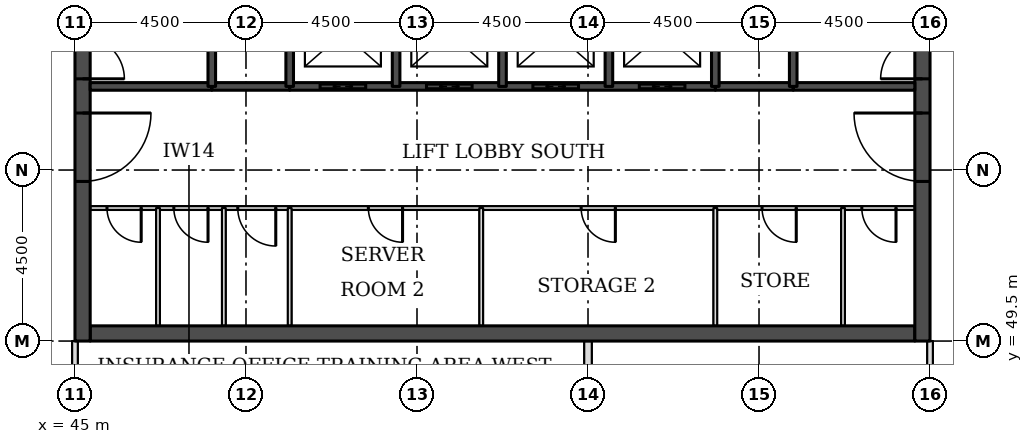
"""IFC4 building model, lengths in metres.
Left out: names, types, materials, properties, quantities, classifications, styles, units other than length and angle.
Written with IfcOpenShell. Run it as: python <this file> out.ifc"""

import sys

from ifc_helpers import new_model, si_unit, direction, frame, frame_2d, origin, place, context, subcontext, project, spatial, rectangle, extrude, element, fill, save


model = new_model("IFC4")
c1 = context("Model", 3, precision=1e-05, world=origin(), true_north=direction((0.0, 1.0)))
c2 = subcontext(c1, "Body", "Model", "MODEL_VIEW")
j1 = project(units=[si_unit("LENGTHUNIT", "METRE"), si_unit("PLANEANGLEUNIT", "RADIAN")], contexts=[c1])
p1 = place(None, origin())
s1 = spatial("IfcSite", under=j1, at=p1, CompositionType="ELEMENT")
p2 = place(p1, origin())
s2 = spatial("IfcBuilding", under=s1, at=p2, CompositionType="ELEMENT")
p3 = place(p2, frame((0.0, 0.0, 219.3)))
s3 = spatial("IfcBuildingStorey", under=s2, at=p3, CompositionType="ELEMENT", Elevation=219.3)
p4 = place(p3, frame((45.4, 49.7, 0.0), z_axis=(0.0, 0.0, 1.0), x_axis=(1.0, 0.0, 0.0)))
e1 = element("IfcWall", 1, at=p4, inside=s3, PredefinedType="SHEAR", context=c2, shape_type="SweptSolid", body=[
    extrude(rectangle(XDim=21.7, YDim=0.4, at=frame_2d((10.85, 0.0))), origin(), (0.0, 0.0, 1.0), 3.7),
])
p5 = place(p3, frame((45.2, 49.5, 0.0), z_axis=(0.0, 0.0, 1.0), x_axis=(0.0, 1.0, 0.0)))
e2 = element("IfcWall", 2, at=p5, inside=s3, PredefinedType="SHEAR", context=c2, shape_type="SweptSolid", body=[
    extrude(rectangle(XDim=22.5, YDim=0.4, at=frame_2d((11.25, 0.0))), origin(), (0.0, 0.0, 1.0), 3.7),
])
p6 = place(p5, frame((4.2, 0.0, 0.0)))
e3 = element("IfcOpeningElement", 3, at=p6, cuts=e2, PredefinedType="OPENING", context=c2, shape_type="SweptSolid", body=[
    extrude(rectangle(XDim=1.8, YDim=2.1, at=frame_2d((0.9, 1.05))), frame((0.0, 0.21, 0.0), z_axis=(0.0, -1.0, 0.0), x_axis=(1.0, 0.0, 0.0)), (0.0, 0.0, 1.0), 0.42),
])
p7 = place(p5, frame((6.9, 0.0, 0.0)))
e4 = element("IfcOpeningElement", 4, at=p7, cuts=e2, PredefinedType="OPENING", context=c2, shape_type="SweptSolid", body=[
    extrude(rectangle(XDim=1.1, YDim=2.1, at=frame_2d((0.55, 1.05))), frame((0.0, 0.21, 0.0), z_axis=(0.0, -1.0, 0.0), x_axis=(1.0, 0.0, 0.0)), (0.0, 0.0, 1.0), 0.42),
])
p8 = place(p5, frame((13.6, 0.0, 0.0)))
e5 = element("IfcOpeningElement", 5, at=p8, cuts=e2, PredefinedType="OPENING", context=c2, shape_type="SweptSolid", body=[
    extrude(rectangle(XDim=1.1, YDim=2.1, at=frame_2d((0.55, 1.05))), frame((0.0, 0.21, 0.0), z_axis=(0.0, -1.0, 0.0), x_axis=(1.0, 0.0, 0.0)), (0.0, 0.0, 1.0), 0.42),
])
p9 = place(p5, frame((16.5, 0.0, 0.0)))
e6 = element("IfcOpeningElement", 6, at=p9, cuts=e2, PredefinedType="OPENING", context=c2, shape_type="SweptSolid", body=[
    extrude(rectangle(XDim=1.8, YDim=2.1, at=frame_2d((0.9, 1.05))), frame((0.0, 0.21, 0.0), z_axis=(0.0, -1.0, 0.0), x_axis=(1.0, 0.0, 0.0)), (0.0, 0.0, 1.0), 0.42),
])
p10 = place(p3, frame((67.3, 49.5, 0.0), z_axis=(0.0, 0.0, 1.0), x_axis=(0.0, 1.0, 0.0)))
e7 = element("IfcWall", 7, at=p10, inside=s3, PredefinedType="SHEAR", context=c2, shape_type="SweptSolid", body=[
    extrude(rectangle(XDim=22.5, YDim=0.4, at=frame_2d((11.25, 0.0))), origin(), (0.0, 0.0, 1.0), 3.7),
])
p11 = place(p10, frame((4.2, 0.0, 0.0)))
e8 = element("IfcOpeningElement", 8, at=p11, cuts=e7, PredefinedType="OPENING", context=c2, shape_type="SweptSolid", body=[
    extrude(rectangle(XDim=1.8, YDim=2.1, at=frame_2d((0.9, 1.05))), frame((0.0, 0.21, 0.0), z_axis=(0.0, -1.0, 0.0), x_axis=(1.0, 0.0, 0.0)), (0.0, 0.0, 1.0), 0.42),
])
p12 = place(p10, frame((6.9, 0.0, 0.0)))
e9 = element("IfcOpeningElement", 9, at=p12, cuts=e7, PredefinedType="OPENING", context=c2, shape_type="SweptSolid", body=[
    extrude(rectangle(XDim=1.1, YDim=2.1, at=frame_2d((0.55, 1.05))), frame((0.0, 0.21, 0.0), z_axis=(0.0, -1.0, 0.0), x_axis=(1.0, 0.0, 0.0)), (0.0, 0.0, 1.0), 0.42),
])
p13 = place(p10, frame((13.6, 0.0, 0.0)))
e10 = element("IfcOpeningElement", 10, at=p13, cuts=e7, PredefinedType="OPENING", context=c2, shape_type="SweptSolid", body=[
    extrude(rectangle(XDim=1.1, YDim=2.1, at=frame_2d((0.55, 1.05))), frame((0.0, 0.21, 0.0), z_axis=(0.0, -1.0, 0.0), x_axis=(1.0, 0.0, 0.0)), (0.0, 0.0, 1.0), 0.42),
])
p14 = place(p10, frame((16.5, 0.0, 0.0)))
e11 = element("IfcOpeningElement", 11, at=p14, cuts=e7, PredefinedType="OPENING", context=c2, shape_type="SweptSolid", body=[
    extrude(rectangle(XDim=1.8, YDim=2.1, at=frame_2d((0.9, 1.05))), frame((0.0, 0.21, 0.0), z_axis=(0.0, -1.0, 0.0), x_axis=(1.0, 0.0, 0.0)), (0.0, 0.0, 1.0), 0.42),
])
p15 = place(p3, frame((58.5, 46.5, 0.0), z_axis=(0.0, 0.0, 1.0), x_axis=(0.0, 1.0, 0.0)))
e12 = element("IfcWall", 12, at=p15, inside=s3, PredefinedType="PARTITIONING", context=c2, shape_type="SweptSolid", body=[
    extrude(rectangle(XDim=3.0, YDim=0.2, at=frame_2d((1.5, 0.0))), origin(), (0.0, 0.0, 1.0), 3.55),
])
for number, where, z_axis, x_axis in (
    (13, (45.0, 48.0, 0.0), (0.0, 0.0, 1.0), (0.0, 1.0, 0.0)),
    (14, (67.5, 48.0, 0.0), (0.0, 0.0, 1.0), (0.0, 1.0, 0.0)),
):
    element("IfcWall", number, at=place(p3, frame(where, z_axis=z_axis, x_axis=x_axis)), inside=s3, PredefinedType="PARTITIONING", context=c2, shape_type="SweptSolid", body=[
        extrude(rectangle(XDim=1.5, YDim=0.15, at=frame_2d((0.75, 0.0))), origin(), (0.0, 0.0, 1.0), 3.022),
    ])
p16 = place(p3, frame((45.4, 53.0, 0.0), z_axis=(0.0, 0.0, 1.0), x_axis=(1.0, 0.0, 0.0)))
e15 = element("IfcWall", 15, at=p16, inside=s3, PredefinedType="PARTITIONING", context=c2, shape_type="SweptSolid", body=[
    extrude(rectangle(XDim=21.7, YDim=0.1, at=frame_2d((10.85, 0.0))), origin(), (0.0, 0.0, 1.0), 3.55),
])
p17 = place(p16, frame((20.305, 0.0, 0.0)))
e16 = element("IfcOpeningElement", 16, at=p17, cuts=e15, PredefinedType="OPENING", context=c2, shape_type="SweptSolid", body=[
    extrude(rectangle(XDim=0.9, YDim=2.1, at=frame_2d((0.45, 1.05))), frame((0.0, 0.06, 0.0), z_axis=(0.0, -1.0, 0.0), x_axis=(1.0, 0.0, 0.0)), (0.0, 0.0, 1.0), 0.12),
])
p18 = place(p16, frame((17.68, 0.0, 0.0)))
e17 = element("IfcOpeningElement", 17, at=p18, cuts=e15, PredefinedType="OPENING", context=c2, shape_type="SweptSolid", body=[
    extrude(rectangle(XDim=0.9, YDim=2.1, at=frame_2d((0.45, 1.05))), frame((0.0, 0.06, 0.0), z_axis=(0.0, -1.0, 0.0), x_axis=(1.0, 0.0, 0.0)), (0.0, 0.0, 1.0), 0.12),
])
p19 = place(p16, frame((0.442, 0.0, 0.0)))
e18 = element("IfcOpeningElement", 18, at=p19, cuts=e15, PredefinedType="OPENING", context=c2, shape_type="SweptSolid", body=[
    extrude(rectangle(XDim=0.9, YDim=2.1, at=frame_2d((0.45, 1.05))), frame((0.0, 0.06, 0.0), z_axis=(0.0, -1.0, 0.0), x_axis=(1.0, 0.0, 0.0)), (0.0, 0.0, 1.0), 0.12),
])
p20 = place(p16, frame((2.201, 0.0, 0.0)))
e19 = element("IfcOpeningElement", 19, at=p20, cuts=e15, PredefinedType="OPENING", context=c2, shape_type="SweptSolid", body=[
    extrude(rectangle(XDim=0.9, YDim=2.1, at=frame_2d((0.45, 1.05))), frame((0.0, 0.06, 0.0), z_axis=(0.0, -1.0, 0.0), x_axis=(1.0, 0.0, 0.0)), (0.0, 0.0, 1.0), 0.12),
])
p21 = place(p16, frame((3.884, 0.0, 0.0)))
e20 = element("IfcOpeningElement", 20, at=p21, cuts=e15, PredefinedType="OPENING", context=c2, shape_type="SweptSolid", body=[
    extrude(rectangle(XDim=1.0, YDim=2.1, at=frame_2d((0.5, 1.05))), frame((0.0, 0.06, 0.0), z_axis=(0.0, -1.0, 0.0), x_axis=(1.0, 0.0, 0.0)), (0.0, 0.0, 1.0), 0.12),
])
p22 = place(p16, frame((7.32, 0.0, 0.0)))
e21 = element("IfcOpeningElement", 21, at=p22, cuts=e15, PredefinedType="OPENING", context=c2, shape_type="SweptSolid", body=[
    extrude(rectangle(XDim=0.9, YDim=2.1, at=frame_2d((0.45, 1.05))), frame((0.0, 0.06, 0.0), z_axis=(0.0, -1.0, 0.0), x_axis=(1.0, 0.0, 0.0)), (0.0, 0.0, 1.0), 0.12),
])
p23 = place(p16, frame((12.92, 0.0, 0.0)))
e22 = element("IfcOpeningElement", 22, at=p23, cuts=e15, PredefinedType="OPENING", context=c2, shape_type="SweptSolid", body=[
    extrude(rectangle(XDim=0.9, YDim=2.1, at=frame_2d((0.45, 1.05))), frame((0.0, 0.06, 0.0), z_axis=(0.0, -1.0, 0.0), x_axis=(1.0, 0.0, 0.0)), (0.0, 0.0, 1.0), 0.12),
])
for number, where, z_axis, x_axis in (
    (23, (48.6, 56.2, 0.0), (0.0, 0.0, 1.0), (1.0, 0.0, 0.0)),
    (24, (61.85, 56.2, 0.0), (0.0, 0.0, 1.0), (1.0, 0.0, 0.0)),
):
    element("IfcWall", number, at=place(p3, frame(where, z_axis=z_axis, x_axis=x_axis)), inside=s3, PredefinedType="SOLIDWALL", context=c2, shape_type="SweptSolid", body=[
        extrude(rectangle(XDim=2.05, YDim=0.2, at=frame_2d((1.025, 0.0))), origin(), (0.0, 0.0, 1.0), 3.55),
    ])
p24 = place(p3, frame((45.4, 56.2, 0.0), z_axis=(0.0, 0.0, 1.0), x_axis=(1.0, 0.0, 0.0)))
e25 = element("IfcWall", 25, at=p24, inside=s3, PredefinedType="SOLIDWALL", context=c2, shape_type="SweptSolid", body=[
    extrude(rectangle(XDim=3.2, YDim=0.2, at=frame_2d((1.6, 0.0))), origin(), (0.0, 0.0, 1.0), 3.55),
])
p25 = place(p3, frame((50.65, 56.2, 0.0), z_axis=(0.0, 0.0, 1.0), x_axis=(1.0, 0.0, 0.0)))
e26 = element("IfcWall", 26, at=p25, inside=s3, PredefinedType="SOLIDWALL", context=c2, shape_type="SweptSolid", body=[
    extrude(rectangle(XDim=11.2, YDim=0.2, at=frame_2d((5.6, 0.0))), origin(), (0.0, 0.0, 1.0), 3.55),
])
p26 = place(p25, frame((0.8, 0.0, 0.0)))
e27 = element("IfcOpeningElement", 27, at=p26, cuts=e26, PredefinedType="OPENING", context=c2, shape_type="SweptSolid", body=[
    extrude(rectangle(XDim=1.2, YDim=2.1, at=frame_2d((0.6, 1.05))), frame((0.0, 0.11, 0.0), z_axis=(0.0, -1.0, 0.0), x_axis=(1.0, 0.0, 0.0)), (0.0, 0.0, 1.0), 0.22),
])
p27 = place(p25, frame((3.6, 0.0, 0.0)))
e28 = element("IfcOpeningElement", 28, at=p27, cuts=e26, PredefinedType="OPENING", context=c2, shape_type="SweptSolid", body=[
    extrude(rectangle(XDim=1.2, YDim=2.1, at=frame_2d((0.6, 1.05))), frame((0.0, 0.11, 0.0), z_axis=(0.0, -1.0, 0.0), x_axis=(1.0, 0.0, 0.0)), (0.0, 0.0, 1.0), 0.22),
])
p28 = place(p25, frame((6.4, 0.0, 0.0)))
e29 = element("IfcOpeningElement", 29, at=p28, cuts=e26, PredefinedType="OPENING", context=c2, shape_type="SweptSolid", body=[
    extrude(rectangle(XDim=1.2, YDim=2.1, at=frame_2d((0.6, 1.05))), frame((0.0, 0.11, 0.0), z_axis=(0.0, -1.0, 0.0), x_axis=(1.0, 0.0, 0.0)), (0.0, 0.0, 1.0), 0.22),
])
p29 = place(p25, frame((9.2, 0.0, 0.0)))
e30 = element("IfcOpeningElement", 30, at=p29, cuts=e26, PredefinedType="OPENING", context=c2, shape_type="SweptSolid", body=[
    extrude(rectangle(XDim=1.2, YDim=2.1, at=frame_2d((0.6, 1.05))), frame((0.0, 0.11, 0.0), z_axis=(0.0, -1.0, 0.0), x_axis=(1.0, 0.0, 0.0)), (0.0, 0.0, 1.0), 0.22),
])
p30 = place(p3, frame((63.9, 56.2, 0.0), z_axis=(0.0, 0.0, 1.0), x_axis=(1.0, 0.0, 0.0)))
e31 = element("IfcWall", 31, at=p30, inside=s3, PredefinedType="SOLIDWALL", context=c2, shape_type="SweptSolid", body=[
    extrude(rectangle(XDim=3.2, YDim=0.2, at=frame_2d((1.6, 0.0))), origin(), (0.0, 0.0, 1.0), 3.55),
])
p31 = place(p3, frame((47.185, 49.9, 0.0), z_axis=(0.0, 0.0, 1.0), x_axis=(0.0, 1.0, 0.0)))
e32 = element("IfcWall", 32, at=p31, inside=s3, PredefinedType="PARTITIONING", context=c2, shape_type="SweptSolid", body=[
    extrude(rectangle(XDim=3.1, YDim=0.1, at=frame_2d((1.55, 0.0))), origin(), (0.0, 0.0, 1.0), 3.55),
])
p32 = place(p3, frame((48.6, 56.2, 0.0), z_axis=(0.0, 0.0, 1.0), x_axis=(0.0, 1.0, 0.0)))
e33 = element("IfcWall", 33, at=p32, inside=s3, PredefinedType="SOLIDWALL", context=c2, shape_type="SweptSolid", body=[
    extrude(rectangle(XDim=5.8, YDim=0.2, at=frame_2d((2.9, 0.0))), origin(), (0.0, 0.0, 1.0), 3.55),
])
for number, where, z_axis, x_axis in (
    (34, (48.917, 49.9, 0.0), (0.0, 0.0, 1.0), (0.0, 1.0, 0.0)),
    (35, (50.65, 49.9, 0.0), (0.0, 0.0, 1.0), (0.0, 1.0, 0.0)),
):
    element("IfcWall", number, at=place(p3, frame(where, z_axis=z_axis, x_axis=x_axis)), inside=s3, PredefinedType="PARTITIONING", context=c2, shape_type="SweptSolid", body=[
        extrude(rectangle(XDim=3.1, YDim=0.1, at=frame_2d((1.55, 0.0))), origin(), (0.0, 0.0, 1.0), 3.55),
    ])
for number, where, z_axis, x_axis in (
    (36, (50.65, 56.2, 0.0), (0.0, 0.0, 1.0), (0.0, 1.0, 0.0)),
    (37, (53.45, 56.2, 0.0), (0.0, 0.0, 1.0), (0.0, 1.0, 0.0)),
):
    element("IfcWall", number, at=place(p3, frame(where, z_axis=z_axis, x_axis=x_axis)), inside=s3, PredefinedType="SOLIDWALL", context=c2, shape_type="SweptSolid", body=[
        extrude(rectangle(XDim=2.8, YDim=0.2, at=frame_2d((1.4, 0.0))), origin(), (0.0, 0.0, 1.0), 3.55),
    ])
p33 = place(p3, frame((55.69, 49.9, 0.0), z_axis=(0.0, 0.0, 1.0), x_axis=(0.0, 1.0, 0.0)))
e38 = element("IfcWall", 38, at=p33, inside=s3, PredefinedType="PARTITIONING", context=c2, shape_type="SweptSolid", body=[
    extrude(rectangle(XDim=3.1, YDim=0.1, at=frame_2d((1.55, 0.0))), origin(), (0.0, 0.0, 1.0), 3.55),
])
for number, where, z_axis, x_axis in (
    (39, (56.25, 56.2, 0.0), (0.0, 0.0, 1.0), (0.0, 1.0, 0.0)),
    (40, (59.05, 56.2, 0.0), (0.0, 0.0, 1.0), (0.0, 1.0, 0.0)),
):
    element("IfcWall", number, at=place(p3, frame(where, z_axis=z_axis, x_axis=x_axis)), inside=s3, PredefinedType="SOLIDWALL", context=c2, shape_type="SweptSolid", body=[
        extrude(rectangle(XDim=2.8, YDim=0.2, at=frame_2d((1.4, 0.0))), origin(), (0.0, 0.0, 1.0), 3.55),
    ])
p34 = place(p3, frame((61.85, 49.9, 0.0), z_axis=(0.0, 0.0, 1.0), x_axis=(0.0, 1.0, 0.0)))
e41 = element("IfcWall", 41, at=p34, inside=s3, PredefinedType="PARTITIONING", context=c2, shape_type="SweptSolid", body=[
    extrude(rectangle(XDim=3.1, YDim=0.1, at=frame_2d((1.55, 0.0))), origin(), (0.0, 0.0, 1.0), 3.55),
])
p35 = place(p3, frame((61.85, 56.2, 0.0), z_axis=(0.0, 0.0, 1.0), x_axis=(0.0, 1.0, 0.0)))
e42 = element("IfcWall", 42, at=p35, inside=s3, PredefinedType="SOLIDWALL", context=c2, shape_type="SweptSolid", body=[
    extrude(rectangle(XDim=2.8, YDim=0.2, at=frame_2d((1.4, 0.0))), origin(), (0.0, 0.0, 1.0), 3.55),
])
p36 = place(p3, frame((63.9, 56.2, 0.0), z_axis=(0.0, 0.0, 1.0), x_axis=(0.0, 1.0, 0.0)))
e43 = element("IfcWall", 43, at=p36, inside=s3, PredefinedType="SOLIDWALL", context=c2, shape_type="SweptSolid", body=[
    extrude(rectangle(XDim=5.8, YDim=0.2, at=frame_2d((2.9, 0.0))), origin(), (0.0, 0.0, 1.0), 3.55),
])
p37 = place(p3, frame((65.21, 49.9, 0.0), z_axis=(0.0, 0.0, 1.0), x_axis=(0.0, 1.0, 0.0)))
e44 = element("IfcWall", 44, at=p37, inside=s3, PredefinedType="PARTITIONING", context=c2, shape_type="SweptSolid", body=[
    extrude(rectangle(XDim=3.1, YDim=0.1, at=frame_2d((1.55, 0.0))), origin(), (0.0, 0.0, 1.0), 3.55),
])
p38 = place(p26, origin())
e45 = element("IfcDoor", 45, at=p38, inside=s3, OperationType="DOUBLE_DOOR_SLIDING", PredefinedType="DOOR", context=c2, shape_type="SweptSolid", body=[
    extrude(rectangle(XDim=1.2, YDim=2.1, at=frame_2d((0.6, 1.05))), frame((0.0, 0.025, 0.0), z_axis=(0.0, -1.0, 0.0), x_axis=(1.0, 0.0, 0.0)), (0.0, 0.0, 1.0), 0.05),
])
fill(e27, e45)
p39 = place(p27, origin())
e46 = element("IfcDoor", 46, at=p39, inside=s3, OperationType="DOUBLE_DOOR_SLIDING", PredefinedType="DOOR", context=c2, shape_type="SweptSolid", body=[
    extrude(rectangle(XDim=1.2, YDim=2.1, at=frame_2d((0.6, 1.05))), frame((0.0, 0.025, 0.0), z_axis=(0.0, -1.0, 0.0), x_axis=(1.0, 0.0, 0.0)), (0.0, 0.0, 1.0), 0.05),
])
fill(e28, e46)
p40 = place(p28, origin())
e47 = element("IfcDoor", 47, at=p40, inside=s3, OperationType="DOUBLE_DOOR_SLIDING", PredefinedType="DOOR", context=c2, shape_type="SweptSolid", body=[
    extrude(rectangle(XDim=1.2, YDim=2.1, at=frame_2d((0.6, 1.05))), frame((0.0, 0.025, 0.0), z_axis=(0.0, -1.0, 0.0), x_axis=(1.0, 0.0, 0.0)), (0.0, 0.0, 1.0), 0.05),
])
fill(e29, e47)
p41 = place(p29, origin())
e48 = element("IfcDoor", 48, at=p41, inside=s3, OperationType="DOUBLE_DOOR_SLIDING", PredefinedType="DOOR", context=c2, shape_type="SweptSolid", body=[
    extrude(rectangle(XDim=1.2, YDim=2.1, at=frame_2d((0.6, 1.05))), frame((0.0, 0.025, 0.0), z_axis=(0.0, -1.0, 0.0), x_axis=(1.0, 0.0, 0.0)), (0.0, 0.0, 1.0), 0.05),
])
fill(e30, e48)
p42 = place(p6, frame((1.8, 0.0, 0.0), z_axis=(0.0, 0.0, 1.0), x_axis=(-1.0, 0.0, 0.0)))
e49 = element("IfcDoor", 49, at=p42, inside=s3, OperationType="SINGLE_SWING_LEFT", PredefinedType="DOOR", context=c2, shape_type="SweptSolid", body=[
    extrude(rectangle(XDim=1.8, YDim=2.1, at=frame_2d((0.9, 1.05))), frame((0.0, 0.025, 0.0), z_axis=(0.0, -1.0, 0.0), x_axis=(1.0, 0.0, 0.0)), (0.0, 0.0, 1.0), 0.05),
])
fill(e3, e49)
p43 = place(p7, frame((1.1, 0.0, 0.0), z_axis=(0.0, 0.0, 1.0), x_axis=(-1.0, 0.0, 0.0)))
e50 = element("IfcDoor", 50, at=p43, inside=s3, OperationType="SINGLE_SWING_RIGHT", PredefinedType="DOOR", context=c2, shape_type="SweptSolid", body=[
    extrude(rectangle(XDim=1.1, YDim=2.1, at=frame_2d((0.55, 1.05))), frame((0.0, 0.025, 0.0), z_axis=(0.0, -1.0, 0.0), x_axis=(1.0, 0.0, 0.0)), (0.0, 0.0, 1.0), 0.05),
])
fill(e4, e50)
p44 = place(p11, origin())
e51 = element("IfcDoor", 51, at=p44, inside=s3, OperationType="SINGLE_SWING_RIGHT", PredefinedType="DOOR", context=c2, shape_type="SweptSolid", body=[
    extrude(rectangle(XDim=1.8, YDim=2.1, at=frame_2d((0.9, 1.05))), frame((0.0, 0.025, 0.0), z_axis=(0.0, -1.0, 0.0), x_axis=(1.0, 0.0, 0.0)), (0.0, 0.0, 1.0), 0.05),
])
fill(e8, e51)
p45 = place(p12, origin())
e52 = element("IfcDoor", 52, at=p45, inside=s3, OperationType="SINGLE_SWING_LEFT", PredefinedType="DOOR", context=c2, shape_type="SweptSolid", body=[
    extrude(rectangle(XDim=1.1, YDim=2.1, at=frame_2d((0.55, 1.05))), frame((0.0, 0.025, 0.0), z_axis=(0.0, -1.0, 0.0), x_axis=(1.0, 0.0, 0.0)), (0.0, 0.0, 1.0), 0.05),
])
fill(e9, e52)
p46 = place(p17, frame((0.9, 0.0, 0.0), z_axis=(0.0, 0.0, 1.0), x_axis=(-1.0, 0.0, 0.0)))
e53 = element("IfcDoor", 53, at=p46, inside=s3, OperationType="SINGLE_SWING_LEFT", PredefinedType="DOOR", context=c2, shape_type="SweptSolid", body=[
    extrude(rectangle(XDim=0.9, YDim=2.1, at=frame_2d((0.45, 1.05))), frame((0.0, 0.025, 0.0), z_axis=(0.0, -1.0, 0.0), x_axis=(1.0, 0.0, 0.0)), (0.0, 0.0, 1.0), 0.05),
])
fill(e16, e53)
p47 = place(p18, frame((0.9, 0.0, 0.0), z_axis=(0.0, 0.0, 1.0), x_axis=(-1.0, 0.0, 0.0)))
e54 = element("IfcDoor", 54, at=p47, inside=s3, OperationType="SINGLE_SWING_LEFT", PredefinedType="DOOR", context=c2, shape_type="SweptSolid", body=[
    extrude(rectangle(XDim=0.9, YDim=2.1, at=frame_2d((0.45, 1.05))), frame((0.0, 0.025, 0.0), z_axis=(0.0, -1.0, 0.0), x_axis=(1.0, 0.0, 0.0)), (0.0, 0.0, 1.0), 0.05),
])
fill(e17, e54)
p48 = place(p19, frame((0.9, 0.0, 0.0), z_axis=(0.0, 0.0, 1.0), x_axis=(-1.0, 0.0, 0.0)))
e55 = element("IfcDoor", 55, at=p48, inside=s3, OperationType="SINGLE_SWING_LEFT", PredefinedType="DOOR", context=c2, shape_type="SweptSolid", body=[
    extrude(rectangle(XDim=0.9, YDim=2.1, at=frame_2d((0.45, 1.05))), frame((0.0, 0.025, 0.0), z_axis=(0.0, -1.0, 0.0), x_axis=(1.0, 0.0, 0.0)), (0.0, 0.0, 1.0), 0.05),
])
fill(e18, e55)
p49 = place(p20, frame((0.9, 0.0, 0.0), z_axis=(0.0, 0.0, 1.0), x_axis=(-1.0, 0.0, 0.0)))
e56 = element("IfcDoor", 56, at=p49, inside=s3, OperationType="SINGLE_SWING_LEFT", PredefinedType="DOOR", context=c2, shape_type="SweptSolid", body=[
    extrude(rectangle(XDim=0.9, YDim=2.1, at=frame_2d((0.45, 1.05))), frame((0.0, 0.025, 0.0), z_axis=(0.0, -1.0, 0.0), x_axis=(1.0, 0.0, 0.0)), (0.0, 0.0, 1.0), 0.05),
])
fill(e19, e56)
p50 = place(p21, frame((1.0, 0.0, 0.0), z_axis=(0.0, 0.0, 1.0), x_axis=(-1.0, 0.0, 0.0)))
e57 = element("IfcDoor", 57, at=p50, inside=s3, OperationType="SINGLE_SWING_LEFT", PredefinedType="DOOR", context=c2, shape_type="SweptSolid", body=[
    extrude(rectangle(XDim=1.0, YDim=2.1, at=frame_2d((0.5, 1.05))), frame((0.0, 0.025, 0.0), z_axis=(0.0, -1.0, 0.0), x_axis=(1.0, 0.0, 0.0)), (0.0, 0.0, 1.0), 0.05),
])
fill(e20, e57)
p51 = place(p22, frame((0.9, 0.0, 0.0), z_axis=(0.0, 0.0, 1.0), x_axis=(-1.0, 0.0, 0.0)))
e58 = element("IfcDoor", 58, at=p51, inside=s3, OperationType="SINGLE_SWING_LEFT", PredefinedType="DOOR", context=c2, shape_type="SweptSolid", body=[
    extrude(rectangle(XDim=0.9, YDim=2.1, at=frame_2d((0.45, 1.05))), frame((0.0, 0.025, 0.0), z_axis=(0.0, -1.0, 0.0), x_axis=(1.0, 0.0, 0.0)), (0.0, 0.0, 1.0), 0.05),
])
fill(e21, e58)
p52 = place(p23, frame((0.9, 0.0, 0.0), z_axis=(0.0, 0.0, 1.0), x_axis=(-1.0, 0.0, 0.0)))
e59 = element("IfcDoor", 59, at=p52, inside=s3, OperationType="SINGLE_SWING_LEFT", PredefinedType="DOOR", context=c2, shape_type="SweptSolid", body=[
    extrude(rectangle(XDim=0.9, YDim=2.1, at=frame_2d((0.45, 1.05))), frame((0.0, 0.025, 0.0), z_axis=(0.0, -1.0, 0.0), x_axis=(1.0, 0.0, 0.0)), (0.0, 0.0, 1.0), 0.05),
])
fill(e22, e59)
save(model, sys.argv[1])
